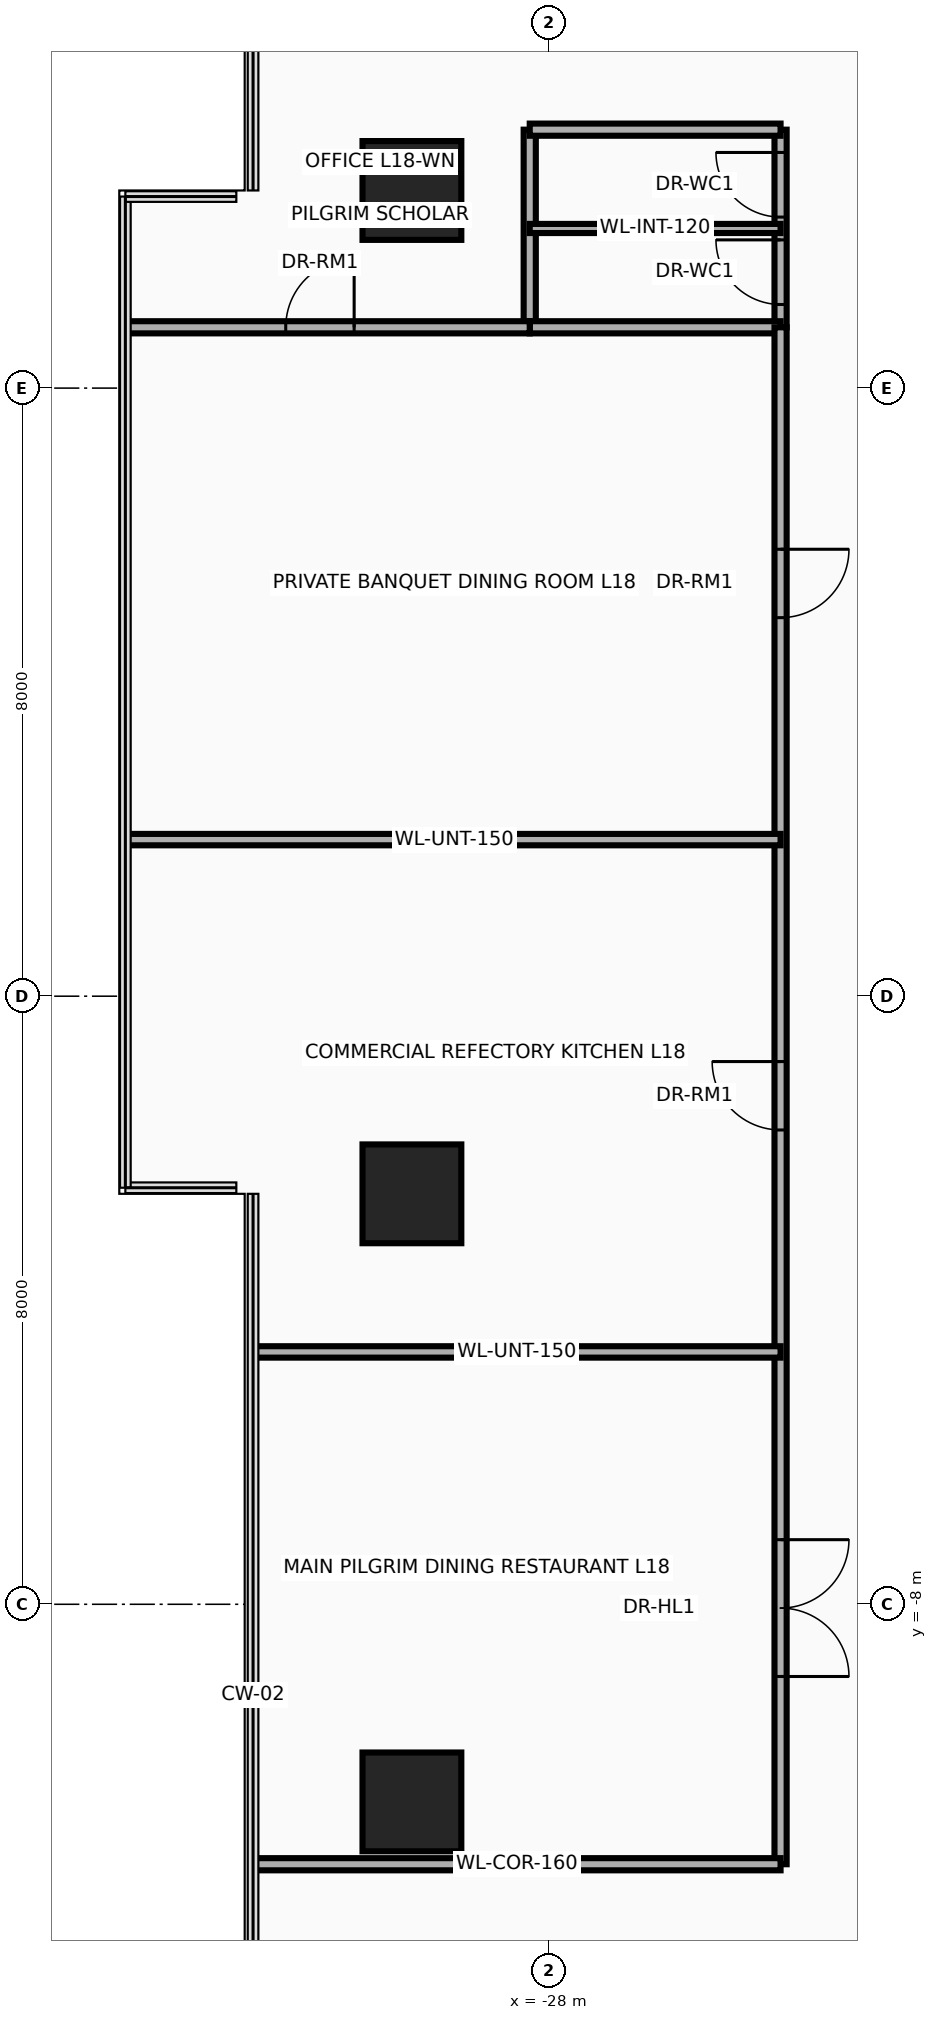
"""IFC4 building model, lengths in metres.
Left out: names, types, materials, properties, quantities, classifications, styles, units other than length and angle.
Written with IfcOpenShell. Run it as: python <this file> out.ifc"""

import sys

from ifc_helpers import new_model, si_unit, direction, frame, frame_2d, origin, origin_2d, place, context, subcontext, project, spatial, rectangle, circle, extrude, source, transform, mapped, element, fill, save


model = new_model("IFC4")
c1 = context("Model", 3, precision=1e-05, world=origin(), true_north=direction((0.0, 1.0)))
c2 = subcontext(c1, "Body", "Model", "MODEL_VIEW")
j1 = project(units=[si_unit("LENGTHUNIT", "METRE"), si_unit("PLANEANGLEUNIT", "RADIAN")], contexts=[c1])
p1 = place(None, origin())
s1 = spatial("IfcSite", under=j1, at=p1, CompositionType="ELEMENT")
p2 = place(p1, origin())
s2 = spatial("IfcBuilding", under=s1, at=p2, CompositionType="ELEMENT")
p3 = place(p2, frame((0.0, 0.0, 74.1)))
s3 = spatial("IfcBuildingStorey", under=s2, at=p3, CompositionType="ELEMENT", Elevation=74.1)
m1 = source(origin(), c2, "Body", "SweptSolid", [
    extrude(circle(Radius=0.65, at=origin_2d()), origin(), (0.0, 0.0, 1.0), 3.7),
])
for number, where, z_axis, x_axis in (
    (1, (-29.8, -10.6, 0.0), (0.0, 0.0, 1.0), (1.0, 0.0, 0.0)),
    (2, (-29.8, -2.6, 0.0), (0.0, 0.0, 1.0), (1.0, 0.0, 0.0)),
    (3, (-29.8, 10.6, 0.0), (0.0, 0.0, 1.0), (1.0, 0.0, 0.0)),
):
    element("IfcColumn", number, at=place(p3, frame(where, z_axis=z_axis, x_axis=x_axis)), inside=s3, PredefinedType="COLUMN", context=c2, shape_type="MappedRepresentation", body=[
        mapped(m1, transform((0.0, 0.0, 0.0), x_axis=(1.0, 0.0, 0.0), y_axis=(0.0, 1.0, 0.0), z_axis=(0.0, 0.0, 1.0), scale=1.0)),
    ])
p4 = place(p3, frame((-28.25, 8.8, 0.0), z_axis=(0.0, 0.0, 1.0), x_axis=(0.0, 1.0, 0.0)))
e4 = element("IfcWall", 4, at=p4, inside=s3, PredefinedType="PARTITIONING", context=c2, shape_type="SweptSolid", body=[
    extrude(rectangle(XDim=2.6, YDim=0.16, at=frame_2d((1.3, 0.0))), origin(), (0.0, 0.0, 1.0), 2.583),
])
p5 = place(p3, frame((-24.95, 8.8, 0.0), z_axis=(0.0, 0.0, 1.0), x_axis=(0.0, 1.0, 0.0)))
e5 = element("IfcWall", 5, at=p5, inside=s3, PredefinedType="PARTITIONING", context=c2, shape_type="SweptSolid", body=[
    extrude(rectangle(XDim=2.6, YDim=0.16, at=frame_2d((1.3, 0.0))), origin(), (0.0, 0.0, 1.0), 2.583),
])
p6 = place(p5, frame((0.3, 0.0, 0.0)))
e6 = element("IfcOpeningElement", 6, at=p6, cuts=e5, PredefinedType="OPENING", context=c2, shape_type="SweptSolid", body=[
    extrude(rectangle(XDim=0.85, YDim=2.1, at=frame_2d((0.425, 1.05))), frame((0.0, 0.095, 0.0), z_axis=(0.0, -1.0, 0.0), x_axis=(1.0, 0.0, 0.0)), (0.0, 0.0, 1.0), 0.19),
])
p7 = place(p5, frame((1.45, 0.0, 0.0)))
e7 = element("IfcOpeningElement", 7, at=p7, cuts=e5, PredefinedType="OPENING", context=c2, shape_type="SweptSolid", body=[
    extrude(rectangle(XDim=0.85, YDim=2.1, at=frame_2d((0.425, 1.05))), frame((0.0, 0.095, 0.0), z_axis=(0.0, -1.0, 0.0), x_axis=(1.0, 0.0, 0.0)), (0.0, 0.0, 1.0), 0.19),
])
for number, where, z_axis, x_axis in (
    (8, (-28.25, 8.8, 0.0), (0.0, 0.0, 1.0), (1.0, 0.0, 0.0)),
    (9, (-28.25, 11.4, 0.0), (0.0, 0.0, 1.0), (1.0, 0.0, 0.0)),
):
    element("IfcWall", number, at=place(p3, frame(where, z_axis=z_axis, x_axis=x_axis)), inside=s3, PredefinedType="PARTITIONING", context=c2, shape_type="SweptSolid", body=[
        extrude(rectangle(XDim=3.3, YDim=0.16, at=frame_2d((1.65, 0.0))), origin(), (0.0, 0.0, 1.0), 3.46),
    ])
p8 = place(p3, frame((-28.25, 10.1, 0.0), z_axis=(0.0, 0.0, 1.0), x_axis=(1.0, 0.0, 0.0)))
e10 = element("IfcWall", 10, at=p8, inside=s3, PredefinedType="PARTITIONING", context=c2, shape_type="SweptSolid", body=[
    extrude(rectangle(XDim=3.3, YDim=0.12, at=frame_2d((1.65, 0.0))), origin(), (0.0, 0.0, 1.0), 3.46),
])
p9 = place(p3, frame((-24.95, -11.42, 0.0), z_axis=(0.0, 0.0, 1.0), x_axis=(0.0, 1.0, 0.0)))
e11 = element("IfcWall", 11, at=p9, inside=s3, PredefinedType="PARTITIONING", context=c2, shape_type="SweptSolid", body=[
    extrude(rectangle(XDim=20.22, YDim=0.16, at=frame_2d((10.11, 0.0))), origin(), (0.0, 0.0, 1.0), 2.583),
])
p10 = place(p9, frame((2.47, 0.0, 0.0)))
e12 = element("IfcOpeningElement", 12, at=p10, cuts=e11, PredefinedType="OPENING", context=c2, shape_type="SweptSolid", body=[
    extrude(rectangle(XDim=1.8, YDim=2.15, at=frame_2d((0.9, 1.075))), frame((0.0, 0.095, 0.0), z_axis=(0.0, -1.0, 0.0), x_axis=(1.0, 0.0, 0.0)), (0.0, 0.0, 1.0), 0.19),
])
p11 = place(p9, frame((9.66, 0.0, 0.0)))
e13 = element("IfcOpeningElement", 13, at=p11, cuts=e11, PredefinedType="OPENING", context=c2, shape_type="SweptSolid", body=[
    extrude(rectangle(XDim=0.9, YDim=2.1, at=frame_2d((0.45, 1.05))), frame((0.0, 0.095, 0.0), z_axis=(0.0, -1.0, 0.0), x_axis=(1.0, 0.0, 0.0)), (0.0, 0.0, 1.0), 0.19),
])
p12 = place(p9, frame((16.4, 0.0, 0.0)))
e14 = element("IfcOpeningElement", 14, at=p12, cuts=e11, PredefinedType="OPENING", context=c2, shape_type="SweptSolid", body=[
    extrude(rectangle(XDim=0.9, YDim=2.1, at=frame_2d((0.45, 1.05))), frame((0.0, 0.095, 0.0), z_axis=(0.0, -1.0, 0.0), x_axis=(1.0, 0.0, 0.0)), (0.0, 0.0, 1.0), 0.19),
])
p13 = place(p3, frame((-33.54, 8.8, 0.0), z_axis=(0.0, 0.0, 1.0), x_axis=(1.0, 0.0, 0.0)))
e15 = element("IfcWall", 15, at=p13, inside=s3, PredefinedType="PARTITIONING", context=c2, shape_type="SweptSolid", body=[
    extrude(rectangle(XDim=5.29, YDim=0.16, at=frame_2d((2.645, 0.0))), origin(), (0.0, 0.0, 1.0), 2.896),
])
p14 = place(p13, frame((2.08, 0.0, 0.0)))
e16 = element("IfcOpeningElement", 16, at=p14, cuts=e15, PredefinedType="OPENING", context=c2, shape_type="SweptSolid", body=[
    extrude(rectangle(XDim=0.9, YDim=2.1, at=frame_2d((0.45, 1.05))), frame((0.0, 0.095, 0.0), z_axis=(0.0, -1.0, 0.0), x_axis=(1.0, 0.0, 0.0)), (0.0, 0.0, 1.0), 0.19),
])
p15 = place(p3, frame((-31.89, -4.68, 0.0), z_axis=(0.0, 0.0, 1.0), x_axis=(1.0, 0.0, 0.0)))
e17 = element("IfcWall", 17, at=p15, inside=s3, PredefinedType="PARTITIONING", context=c2, shape_type="SweptSolid", body=[
    extrude(rectangle(XDim=6.94, YDim=0.15, at=frame_2d((3.47, 0.0))), origin(), (0.0, 0.0, 1.0), 2.896),
])
p16 = place(p3, frame((-33.54, 2.06, 0.0), z_axis=(0.0, 0.0, 1.0), x_axis=(1.0, 0.0, 0.0)))
e18 = element("IfcWall", 18, at=p16, inside=s3, PredefinedType="PARTITIONING", context=c2, shape_type="SweptSolid", body=[
    extrude(rectangle(XDim=8.59, YDim=0.15, at=frame_2d((4.295, 0.0))), origin(), (0.0, 0.0, 1.0), 2.896),
])
p17 = place(p3, frame((-31.89, -11.42, 0.0), z_axis=(0.0, 0.0, 1.0), x_axis=(1.0, 0.0, 0.0)))
e19 = element("IfcWall", 19, at=p17, inside=s3, PredefinedType="PARTITIONING", context=c2, shape_type="SweptSolid", body=[
    extrude(rectangle(XDim=6.94, YDim=0.16, at=frame_2d((3.47, 0.0))), origin(), (0.0, 0.0, 1.0), 3.46),
])
p18 = place(p6, origin())
e20 = element("IfcDoor", 20, at=p18, inside=s3, OperationType="SINGLE_SWING_RIGHT", PredefinedType="DOOR", context=c2, shape_type="SweptSolid", body=[
    extrude(rectangle(XDim=0.85, YDim=2.1, at=frame_2d((0.425, 1.05))), frame((0.0, 0.025, 0.0), z_axis=(0.0, -1.0, 0.0), x_axis=(1.0, 0.0, 0.0)), (0.0, 0.0, 1.0), 0.05),
])
fill(e6, e20)
p19 = place(p7, origin())
e21 = element("IfcDoor", 21, at=p19, inside=s3, OperationType="SINGLE_SWING_LEFT", PredefinedType="DOOR", context=c2, shape_type="SweptSolid", body=[
    extrude(rectangle(XDim=0.85, YDim=2.1, at=frame_2d((0.425, 1.05))), frame((0.0, 0.025, 0.0), z_axis=(0.0, -1.0, 0.0), x_axis=(1.0, 0.0, 0.0)), (0.0, 0.0, 1.0), 0.05),
])
fill(e7, e21)
p20 = place(p14, origin())
e22 = element("IfcDoor", 22, at=p20, inside=s3, OperationType="SINGLE_SWING_RIGHT", PredefinedType="DOOR", context=c2, shape_type="SweptSolid", body=[
    extrude(rectangle(XDim=0.9, YDim=2.1, at=frame_2d((0.45, 1.05))), frame((0.0, 0.025, 0.0), z_axis=(0.0, -1.0, 0.0), x_axis=(1.0, 0.0, 0.0)), (0.0, 0.0, 1.0), 0.05),
])
fill(e16, e22)
p21 = place(p10, frame((1.8, 0.0, 0.0), z_axis=(0.0, 0.0, 1.0), x_axis=(-1.0, 0.0, 0.0)))
e23 = element("IfcDoor", 23, at=p21, inside=s3, OperationType="DOUBLE_DOOR_SINGLE_SWING", PredefinedType="DOOR", context=c2, shape_type="SweptSolid", body=[
    extrude(rectangle(XDim=1.8, YDim=2.15, at=frame_2d((0.9, 1.075))), frame((0.0, 0.025, 0.0), z_axis=(0.0, -1.0, 0.0), x_axis=(1.0, 0.0, 0.0)), (0.0, 0.0, 1.0), 0.05),
])
fill(e12, e23)
p22 = place(p11, origin())
e24 = element("IfcDoor", 24, at=p22, inside=s3, OperationType="SINGLE_SWING_RIGHT", PredefinedType="DOOR", context=c2, shape_type="SweptSolid", body=[
    extrude(rectangle(XDim=0.9, YDim=2.1, at=frame_2d((0.45, 1.05))), frame((0.0, 0.025, 0.0), z_axis=(0.0, -1.0, 0.0), x_axis=(1.0, 0.0, 0.0)), (0.0, 0.0, 1.0), 0.05),
])
fill(e13, e24)
p23 = place(p12, frame((0.9, 0.0, 0.0), z_axis=(0.0, 0.0, 1.0), x_axis=(-1.0, 0.0, 0.0)))
e25 = element("IfcDoor", 25, at=p23, inside=s3, OperationType="SINGLE_SWING_LEFT", PredefinedType="DOOR", context=c2, shape_type="SweptSolid", body=[
    extrude(rectangle(XDim=0.9, YDim=2.1, at=frame_2d((0.45, 1.05))), frame((0.0, 0.025, 0.0), z_axis=(0.0, -1.0, 0.0), x_axis=(1.0, 0.0, 0.0)), (0.0, 0.0, 1.0), 0.05),
])
fill(e14, e25)
save(model, sys.argv[1])
